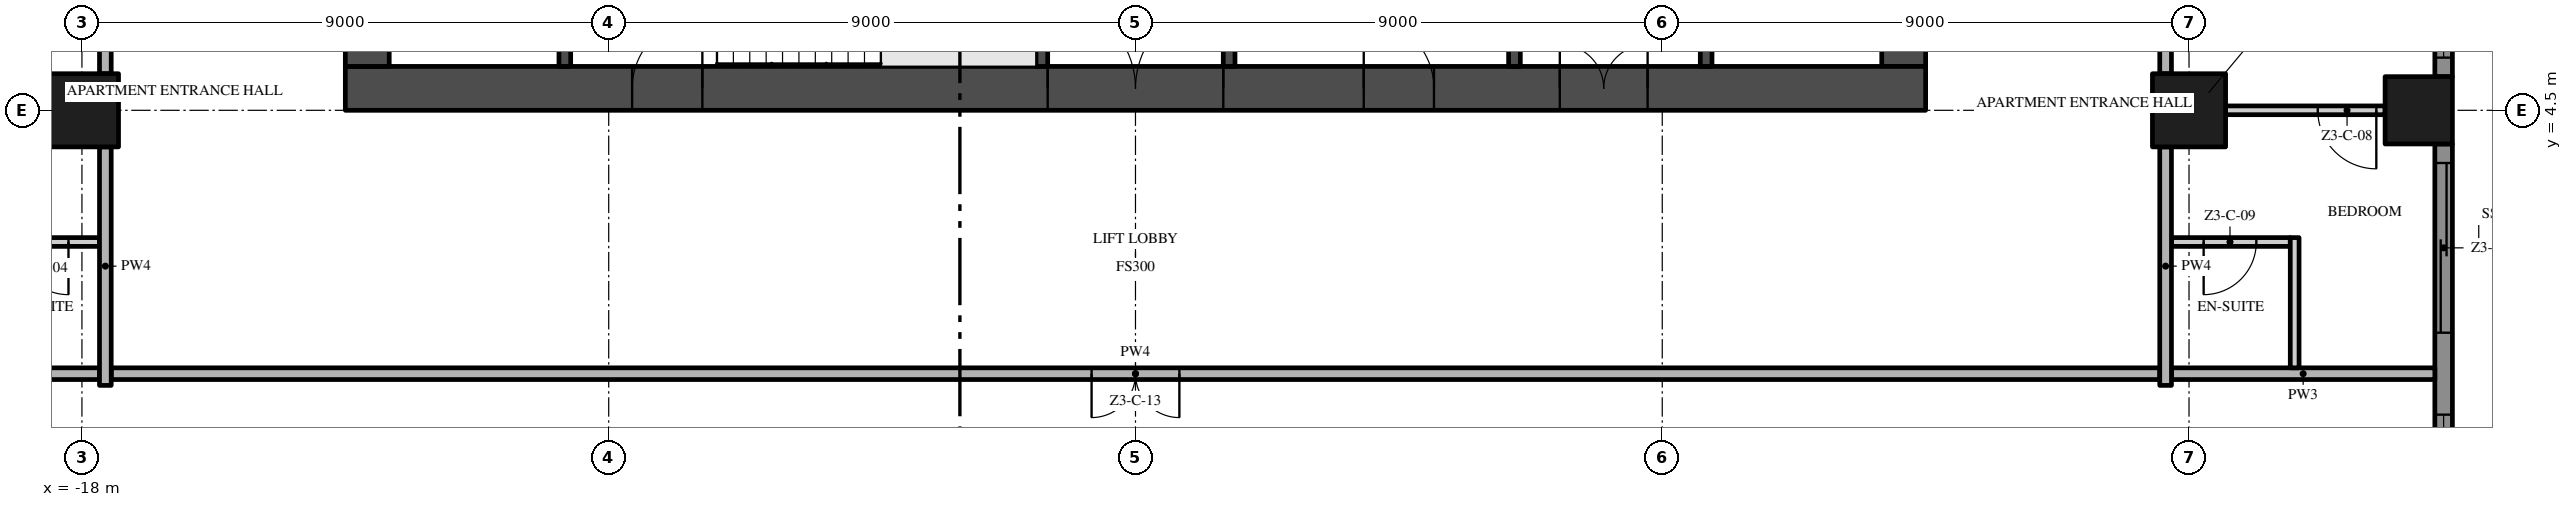
"""IFC4 building model, lengths in metres.
Left out: names, types, materials, properties, quantities, classifications, styles, units other than length and angle.
Written with IfcOpenShell. Run it as: python <this file> out.ifc"""

import sys

from ifc_helpers import new_model, si_unit, direction, frame, frame_2d, origin, origin_2d, place, context, subcontext, project, spatial, polyline, rectangle, outline, extrude, element, fill, save


model = new_model("IFC4")
c1 = context("Model", 3, precision=1e-05, world=origin(), true_north=direction((0.0, 1.0)))
c2 = subcontext(c1, "Body", "Model", "MODEL_VIEW")
j1 = project(units=[si_unit("LENGTHUNIT", "METRE"), si_unit("PLANEANGLEUNIT", "RADIAN")], contexts=[c1])
p1 = place(None, origin())
s1 = spatial("IfcSite", under=j1, at=p1, CompositionType="ELEMENT")
p2 = place(p1, origin())
s2 = spatial("IfcBuilding", under=s1, at=p2, CompositionType="ELEMENT")
p3 = place(p2, frame((0.0, 0.0, 147.8)))
s3 = spatial("IfcBuildingStorey", under=s2, at=p3, CompositionType="ELEMENT", Elevation=147.8)
p4 = place(p3, frame((-13.5, 4.875, -0.3), z_axis=(0.0, 0.0, 1.0), x_axis=(1.0, 0.0, 0.0)))
e1 = element("IfcWall", 1, at=p4, inside=s3, PredefinedType="SHEAR", context=c2, shape_type="SweptSolid", body=[
    extrude(rectangle(XDim=27.0, YDim=0.75, at=frame_2d((13.5, 0.0))), origin(), (0.0, 0.0, 1.0), 3.8),
])
p5 = place(p4, frame((12.0, 0.0, 0.3)))
e2 = element("IfcOpeningElement", 2, at=p5, cuts=e1, PredefinedType="OPENING", context=c2, shape_type="SweptSolid", body=[
    extrude(rectangle(XDim=3.0, YDim=2.4, at=frame_2d((1.5, 1.2))), frame((0.0, 0.385, 0.0), z_axis=(0.0, -1.0, 0.0), x_axis=(1.0, 0.0, 0.0)), (0.0, 0.0, 1.0), 0.77),
])
p6 = place(p4, frame((4.9, 0.0, 0.3)))
e3 = element("IfcOpeningElement", 3, at=p6, cuts=e1, PredefinedType="OPENING", context=c2, shape_type="SweptSolid", body=[
    extrude(rectangle(XDim=1.2, YDim=2.2, at=frame_2d((0.6, 1.1))), frame((0.0, 0.385, 0.0), z_axis=(0.0, -1.0, 0.0), x_axis=(1.0, 0.0, 0.0)), (0.0, 0.0, 1.0), 0.77),
])
p7 = place(p4, frame((20.75, 0.0, 0.3)))
e4 = element("IfcOpeningElement", 4, at=p7, cuts=e1, PredefinedType="OPENING", context=c2, shape_type="SweptSolid", body=[
    extrude(rectangle(XDim=1.5, YDim=2.2, at=frame_2d((0.75, 1.1))), frame((0.0, 0.385, 0.0), z_axis=(0.0, -1.0, 0.0), x_axis=(1.0, 0.0, 0.0)), (0.0, 0.0, 1.0), 0.77),
])
p8 = place(p4, frame((17.4, 0.0, 0.3)))
e5 = element("IfcOpeningElement", 5, at=p8, cuts=e1, PredefinedType="OPENING", context=c2, shape_type="SweptSolid", body=[
    extrude(rectangle(XDim=1.2, YDim=2.2, at=frame_2d((0.6, 1.1))), frame((0.0, 0.385, 0.0), z_axis=(0.0, -1.0, 0.0), x_axis=(1.0, 0.0, 0.0)), (0.0, 0.0, 1.0), 0.77),
])
p9 = place(p3, frame((13.125, 5.25, -0.3), z_axis=(0.0, 0.0, 1.0), x_axis=(0.0, 1.0, 0.0)))
e6 = element("IfcWall", 6, at=p9, inside=s3, PredefinedType="SHEAR", context=c2, shape_type="SweptSolid", body=[
    extrude(rectangle(XDim=16.5, YDim=0.75, at=frame_2d((8.25, 0.0))), origin(), (0.0, 0.0, 1.0), 3.8),
])
p10 = place(p9, frame((6.15, 0.0, 0.3)))
e7 = element("IfcOpeningElement", 7, at=p10, cuts=e6, PredefinedType="OPENING", context=c2, shape_type="SweptSolid", body=[
    extrude(rectangle(XDim=1.2, YDim=2.2, at=frame_2d((0.6, 1.1))), frame((0.0, 0.385, 0.0), z_axis=(0.0, -1.0, 0.0), x_axis=(1.0, 0.0, 0.0)), (0.0, 0.0, 1.0), 0.77),
])
p11 = place(p3, frame((-13.125, 21.75, -0.3), z_axis=(0.0, 0.0, 1.0), x_axis=(0.0, -1.0, 0.0)))
e8 = element("IfcWall", 8, at=p11, inside=s3, PredefinedType="SHEAR", context=c2, shape_type="SweptSolid", body=[
    extrude(rectangle(XDim=16.5, YDim=0.75, at=frame_2d((8.25, 0.0))), origin(), (0.0, 0.0, 1.0), 3.8),
])
p12 = place(p11, frame((9.15, 0.0, 0.3)))
e9 = element("IfcOpeningElement", 9, at=p12, cuts=e8, PredefinedType="OPENING", context=c2, shape_type="SweptSolid", body=[
    extrude(rectangle(XDim=1.2, YDim=2.2, at=frame_2d((0.6, 1.1))), frame((0.0, 0.385, 0.0), z_axis=(0.0, -1.0, 0.0), x_axis=(1.0, 0.0, 0.0)), (0.0, 0.0, 1.0), 0.77),
])
for number, where, z_axis, x_axis in (
    (10, (-18.0, 4.5, 0.0), (0.0, 0.0, 1.0), (1.0, 0.0, 0.0)),
    (11, (18.0, 4.5, 0.0), (0.0, 0.0, 1.0), (1.0, 0.0, 0.0)),
):
    element("IfcColumn", number, at=place(p3, frame(where, z_axis=z_axis, x_axis=x_axis)), inside=s3, PredefinedType="COLUMN", context=c2, shape_type="SweptSolid", body=[
        extrude(rectangle(XDim=1.25, YDim=1.25, at=origin_2d()), origin(), (0.0, 0.0, 1.0), 3.5),
    ])
p13 = place(p3, frame((21.925, 4.5, 0.0), z_axis=(0.0, 0.0, 1.0), x_axis=(1.0, 0.0, 0.0)))
e12 = element("IfcColumn", 12, at=p13, inside=s3, PredefinedType="COLUMN", context=c2, shape_type="SweptSolid", body=[
    extrude(rectangle(XDim=1.15, YDim=1.15, at=origin_2d()), origin(), (0.0, 0.0, 1.0), 3.5),
])
p14 = place(p3, frame((22.35, 3.925, 0.0), z_axis=(0.0, 0.0, 1.0), x_axis=(0.0, -1.0, 0.0)))
e13 = element("IfcWall", 13, at=p14, inside=s3, PredefinedType="SOLIDWALL", context=c2, shape_type="SweptSolid", body=[
    extrude(rectangle(XDim=7.85, YDim=0.3, at=frame_2d((3.925, 0.0))), origin(), (0.0, 0.0, 1.0), 3.5),
])
p15 = place(p14, frame((4.625, 0.0, 0.45)))
e14 = element("IfcOpeningElement", 14, at=p15, cuts=e13, PredefinedType="OPENING", context=c2, shape_type="SweptSolid", body=[
    extrude(rectangle(XDim=2.9, YDim=2.65, at=frame_2d((1.45, 1.325))), frame((0.0, 0.16, 0.0), z_axis=(0.0, -1.0, 0.0), x_axis=(1.0, 0.0, 0.0)), (0.0, 0.0, 1.0), 0.32),
])
p16 = place(p14, frame((0.325, 0.0, 0.0)))
e15 = element("IfcOpeningElement", 15, at=p16, cuts=e13, PredefinedType="OPENING", context=c2, shape_type="SweptSolid", body=[
    extrude(rectangle(XDim=2.9, YDim=2.4, at=frame_2d((1.45, 1.2))), frame((0.0, 0.16, 0.0), z_axis=(0.0, -1.0, 0.0), x_axis=(1.0, 0.0, 0.0)), (0.0, 0.0, 1.0), 0.32),
])
p17 = place(p3, frame((22.35, 12.925, 0.0), z_axis=(0.0, 0.0, 1.0), x_axis=(0.0, -1.0, 0.0)))
e16 = element("IfcWall", 16, at=p17, inside=s3, PredefinedType="SOLIDWALL", context=c2, shape_type="SweptSolid", body=[
    extrude(rectangle(XDim=7.85, YDim=0.3, at=frame_2d((3.925, 0.0))), origin(), (0.0, 0.0, 1.0), 3.5),
])
p18 = place(p17, frame((4.625, 0.0, 0.45)))
e17 = element("IfcOpeningElement", 17, at=p18, cuts=e16, PredefinedType="OPENING", context=c2, shape_type="SweptSolid", body=[
    extrude(rectangle(XDim=2.9, YDim=2.65, at=frame_2d((1.45, 1.325))), frame((0.0, 0.16, 0.0), z_axis=(0.0, -1.0, 0.0), x_axis=(1.0, 0.0, 0.0)), (0.0, 0.0, 1.0), 0.32),
])
p19 = place(p17, frame((0.325, 0.0, 0.45)))
e18 = element("IfcOpeningElement", 18, at=p19, cuts=e16, PredefinedType="OPENING", context=c2, shape_type="SweptSolid", body=[
    extrude(rectangle(XDim=2.9, YDim=2.65, at=frame_2d((1.45, 1.325))), frame((0.0, 0.16, 0.0), z_axis=(0.0, -1.0, 0.0), x_axis=(1.0, 0.0, 0.0)), (0.0, 0.0, 1.0), 0.32),
])
p20 = place(p3, origin())
e19 = element("IfcWall", 19, at=p20, inside=s3, PredefinedType="USERDEFINED", context=c2, shape_type="SweptSolid", body=[
    extrude(outline(polyline([(25.149, -13.5), (25.485, -12.0), (25.5, -11.625), (25.369, -10.5), (24.845, -9.0), (24.112, -7.5), (23.451, -6.0), (23.115, -4.5), (23.1, -4.125), (23.231, -3.0), (23.755, -1.5), (24.488, 0.0), (25.149, 1.5), (25.485, 3.0), (25.5, 3.375), (25.369, 4.5), (24.845, 6.0), (24.112, 7.5), (23.451, 9.0), (23.115, 10.5), (23.1, 10.875), (23.231, 12.0), (23.755, 13.5), (24.488, 15.0), (25.149, 16.5), (25.485, 18.0), (25.241, 18.055), (24.91, 16.579), (24.261, 15.105), (23.524, 13.596), (22.986, 12.056), (22.849, 10.885), (22.866, 10.467), (23.213, 8.921), (23.885, 7.395), (24.614, 5.904), (25.124, 4.444), (25.249, 3.365), (25.236, 3.033), (24.91, 1.579), (24.261, 0.105), (23.524, -1.404), (22.986, -2.944), (22.849, -4.115), (22.866, -4.533), (23.213, -6.079), (23.885, -7.605), (24.614, -9.096), (25.124, -10.556), (25.249, -11.635), (25.236, -11.967), (24.905, -13.445), (25.149, -13.5)])), origin(), (0.0, 0.0, 1.0), 0.9),
])
for number, where, z_axis, x_axis in (
    (20, (-9.75, 5.25, 0.0), (0.0, 0.0, 1.0), (0.0, 1.0, 0.0)),
    (21, (-1.6, 5.25, 0.0), (0.0, 0.0, 1.0), (0.0, 1.0, 0.0)),
):
    element("IfcWall", number, at=place(p3, frame(where, z_axis=z_axis, x_axis=x_axis)), inside=s3, PredefinedType="SHEAR", context=c2, shape_type="SweptSolid", body=[
        extrude(rectangle(XDim=2.7, YDim=0.2, at=frame_2d((1.35, 0.0))), origin(), (0.0, 0.0, 1.0), 3.5),
    ])
p21 = place(p3, frame((1.6, 11.5, 0.0), z_axis=(0.0, 0.0, 1.0), x_axis=(0.0, -1.0, 0.0)))
e22 = element("IfcWall", 22, at=p21, inside=s3, PredefinedType="SHEAR", context=c2, shape_type="SweptSolid", body=[
    extrude(rectangle(XDim=6.25, YDim=0.2, at=frame_2d((3.125, 0.0))), origin(), (0.0, 0.0, 1.0), 3.5),
])
p22 = place(p21, frame((2.275, 0.0, 0.0)))
e23 = element("IfcOpeningElement", 23, at=p22, cuts=e22, PredefinedType="OPENING", context=c2, shape_type="SweptSolid", body=[
    extrude(rectangle(XDim=0.9, YDim=2.1, at=frame_2d((0.45, 1.05))), frame((0.0, 0.11, 0.0), z_axis=(0.0, -1.0, 0.0), x_axis=(1.0, 0.0, 0.0)), (0.0, 0.0, 1.0), 0.22),
])
p23 = place(p3, frame((6.475, 5.25, 0.0), z_axis=(0.0, 0.0, 1.0), x_axis=(0.0, 1.0, 0.0)))
e24 = element("IfcWall", 24, at=p23, inside=s3, PredefinedType="SHEAR", context=c2, shape_type="SweptSolid", body=[
    extrude(rectangle(XDim=6.25, YDim=0.2, at=frame_2d((3.125, 0.0))), origin(), (0.0, 0.0, 1.0), 3.5),
])
p24 = place(p3, frame((9.75, 5.25, 0.0), z_axis=(0.0, 0.0, 1.0), x_axis=(0.0, 1.0, 0.0)))
e25 = element("IfcWall", 25, at=p24, inside=s3, PredefinedType="SHEAR", context=c2, shape_type="SweptSolid", body=[
    extrude(rectangle(XDim=2.35, YDim=0.2, at=frame_2d((1.175, 0.0))), origin(), (0.0, 0.0, 1.0), 3.5),
])
p25 = place(p24, frame((0.7, 0.0, 0.0)))
e26 = element("IfcOpeningElement", 26, at=p25, cuts=e25, PredefinedType="OPENING", context=c2, shape_type="SweptSolid", body=[
    extrude(rectangle(XDim=1.1, YDim=2.1, at=frame_2d((0.55, 1.05))), frame((0.0, 0.11, 0.0), z_axis=(0.0, -1.0, 0.0), x_axis=(1.0, 0.0, 0.0)), (0.0, 0.0, 1.0), 0.22),
])
p26 = place(p3, frame((17.5, 0.0, 0.0), z_axis=(0.0, 0.0, 1.0), x_axis=(-1.0, 0.0, 0.0)))
e27 = element("IfcWall", 27, at=p26, inside=s3, PredefinedType="PARTITIONING", context=c2, shape_type="SweptSolid", body=[
    extrude(rectangle(XDim=35.0, YDim=0.2, at=frame_2d((17.5, 0.0))), origin(), (0.0, 0.0, 1.0), 3.5),
])
p27 = place(p26, frame((16.75, 0.0, 0.0)))
e28 = element("IfcOpeningElement", 28, at=p27, cuts=e27, PredefinedType="OPENING", context=c2, shape_type="SweptSolid", body=[
    extrude(rectangle(XDim=1.5, YDim=2.4, at=frame_2d((0.75, 1.2))), frame((0.0, 0.11, 0.0), z_axis=(0.0, -1.0, 0.0), x_axis=(1.0, 0.0, 0.0)), (0.0, 0.0, 1.0), 0.22),
])
for number, where, z_axis, x_axis in (
    (29, (-22.2, 0.0, 0.0), (0.0, 0.0, 1.0), (1.0, 0.0, 0.0)),
    (30, (17.7, 0.0, 0.0), (0.0, 0.0, 1.0), (1.0, 0.0, 0.0)),
):
    element("IfcWall", number, at=place(p3, frame(where, z_axis=z_axis, x_axis=x_axis)), inside=s3, PredefinedType="PARTITIONING", context=c2, shape_type="SweptSolid", body=[
        extrude(rectangle(XDim=4.5, YDim=0.2, at=frame_2d((2.25, 0.0))), origin(), (0.0, 0.0, 1.0), 3.5),
    ])
p28 = place(p3, frame((-17.7, 2.25, 0.0), z_axis=(0.0, 0.0, 1.0), x_axis=(-1.0, 0.0, 0.0)))
e31 = element("IfcWall", 31, at=p28, inside=s3, PredefinedType="PARTITIONING", context=c2, shape_type="SweptSolid", body=[
    extrude(rectangle(XDim=2.03, YDim=0.15, at=frame_2d((1.015, 0.0))), origin(), (0.0, 0.0, 1.0), 3.5),
])
p29 = place(p28, frame((0.53, 0.0, 0.0)))
e32 = element("IfcOpeningElement", 32, at=p29, cuts=e31, PredefinedType="OPENING", context=c2, shape_type="SweptSolid", body=[
    extrude(rectangle(XDim=0.9, YDim=2.1, at=frame_2d((0.45, 1.05))), frame((0.0, 0.085, 0.0), z_axis=(0.0, -1.0, 0.0), x_axis=(1.0, 0.0, 0.0)), (0.0, 0.0, 1.0), 0.17),
])
p30 = place(p3, frame((19.73, 2.25, 0.0), z_axis=(0.0, 0.0, 1.0), x_axis=(-1.0, 0.0, 0.0)))
e33 = element("IfcWall", 33, at=p30, inside=s3, PredefinedType="PARTITIONING", context=c2, shape_type="SweptSolid", body=[
    extrude(rectangle(XDim=2.03, YDim=0.15, at=frame_2d((1.015, 0.0))), origin(), (0.0, 0.0, 1.0), 3.5),
])
p31 = place(p30, frame((0.58, 0.0, 0.0)))
e34 = element("IfcOpeningElement", 34, at=p31, cuts=e33, PredefinedType="OPENING", context=c2, shape_type="SweptSolid", body=[
    extrude(rectangle(XDim=0.9, YDim=2.1, at=frame_2d((0.45, 1.05))), frame((0.0, 0.085, 0.0), z_axis=(0.0, -1.0, 0.0), x_axis=(1.0, 0.0, 0.0)), (0.0, 0.0, 1.0), 0.17),
])
p32 = place(p3, frame((21.35, 4.5, 0.0), z_axis=(0.0, 0.0, 1.0), x_axis=(-1.0, 0.0, 0.0)))
e35 = element("IfcWall", 35, at=p32, inside=s3, PredefinedType="PARTITIONING", context=c2, shape_type="SweptSolid", body=[
    extrude(rectangle(XDim=2.725, YDim=0.15, at=frame_2d((1.363, 0.0))), origin(), (0.0, 0.0, 1.0), 3.5),
])
p33 = place(p32, frame((0.15, 0.0, 0.0)))
e36 = element("IfcOpeningElement", 36, at=p33, cuts=e35, PredefinedType="OPENING", context=c2, shape_type="SweptSolid", body=[
    extrude(rectangle(XDim=1.0, YDim=2.4, at=frame_2d((0.5, 1.2))), frame((0.0, 0.085, 0.0), z_axis=(0.0, -1.0, 0.0), x_axis=(1.0, 0.0, 0.0)), (0.0, 0.0, 1.0), 0.17),
])
p34 = place(p3, frame((-17.6, -0.2, 0.0), z_axis=(0.0, 0.0, 1.0), x_axis=(0.0, 1.0, 0.0)))
e37 = element("IfcWall", 37, at=p34, inside=s3, PredefinedType="PARTITIONING", context=c2, shape_type="SweptSolid", body=[
    extrude(rectangle(XDim=4.075, YDim=0.2, at=frame_2d((2.038, 0.0))), origin(), (0.0, 0.0, 1.0), 3.5),
])
p35 = place(p3, frame((-17.6, 5.125, 0.0), z_axis=(0.0, 0.0, 1.0), x_axis=(0.0, 1.0, 0.0)))
e38 = element("IfcWall", 38, at=p35, inside=s3, PredefinedType="PARTITIONING", context=c2, shape_type="SweptSolid", body=[
    extrude(rectangle(XDim=7.75, YDim=0.2, at=frame_2d((3.875, 0.0))), origin(), (0.0, 0.0, 1.0), 3.5),
])
p36 = place(p35, frame((1.0, 0.0, 0.0)))
e39 = element("IfcOpeningElement", 39, at=p36, cuts=e38, PredefinedType="OPENING", context=c2, shape_type="SweptSolid", body=[
    extrude(rectangle(XDim=1.2, YDim=2.4, at=frame_2d((0.6, 1.2))), frame((0.0, 0.11, 0.0), z_axis=(0.0, -1.0, 0.0), x_axis=(1.0, 0.0, 0.0)), (0.0, 0.0, 1.0), 0.22),
])
p37 = place(p3, frame((17.6, -0.2, 0.0), z_axis=(0.0, 0.0, 1.0), x_axis=(0.0, 1.0, 0.0)))
e40 = element("IfcWall", 40, at=p37, inside=s3, PredefinedType="PARTITIONING", context=c2, shape_type="SweptSolid", body=[
    extrude(rectangle(XDim=4.075, YDim=0.2, at=frame_2d((2.038, 0.0))), origin(), (0.0, 0.0, 1.0), 3.5),
])
p38 = place(p3, frame((17.6, 12.875, 0.0), z_axis=(0.0, 0.0, 1.0), x_axis=(0.0, -1.0, 0.0)))
e41 = element("IfcWall", 41, at=p38, inside=s3, PredefinedType="PARTITIONING", context=c2, shape_type="SweptSolid", body=[
    extrude(rectangle(XDim=7.75, YDim=0.2, at=frame_2d((3.875, 0.0))), origin(), (0.0, 0.0, 1.0), 3.5),
])
p39 = place(p38, frame((5.55, 0.0, 0.0)))
e42 = element("IfcOpeningElement", 42, at=p39, cuts=e41, PredefinedType="OPENING", context=c2, shape_type="SweptSolid", body=[
    extrude(rectangle(XDim=1.2, YDim=2.4, at=frame_2d((0.6, 1.2))), frame((0.0, 0.11, 0.0), z_axis=(0.0, -1.0, 0.0), x_axis=(1.0, 0.0, 0.0)), (0.0, 0.0, 1.0), 0.22),
])
p40 = place(p3, frame((19.805, 0.1, 0.0), z_axis=(0.0, 0.0, 1.0), x_axis=(0.0, 1.0, 0.0)))
e43 = element("IfcWall", 43, at=p40, inside=s3, PredefinedType="PARTITIONING", context=c2, shape_type="SweptSolid", body=[
    extrude(rectangle(XDim=2.225, YDim=0.15, at=frame_2d((1.113, 0.0))), origin(), (0.0, 0.0, 1.0), 3.5),
])
p41 = place(p15, origin())
e44 = element("IfcWindow", 44, at=p41, inside=s3, PartitioningType="SINGLE_PANEL", PredefinedType="WINDOW", context=c2, shape_type="SweptSolid", body=[
    extrude(rectangle(XDim=2.9, YDim=2.65, at=frame_2d((1.45, 1.325))), frame((0.0, 0.03, 0.0), z_axis=(0.0, -1.0, 0.0), x_axis=(1.0, 0.0, 0.0)), (0.0, 0.0, 1.0), 0.06),
])
fill(e14, e44)
p42 = place(p16, origin())
e45 = element("IfcDoor", 45, at=p42, inside=s3, OperationType="SINGLE_SWING_LEFT", PredefinedType="DOOR", context=c2, shape_type="SweptSolid", body=[
    extrude(rectangle(XDim=2.9, YDim=2.4, at=frame_2d((1.45, 1.2))), frame((0.0, 0.025, 0.0), z_axis=(0.0, -1.0, 0.0), x_axis=(1.0, 0.0, 0.0)), (0.0, 0.0, 1.0), 0.05),
])
fill(e15, e45)
p43 = place(p18, origin())
e46 = element("IfcWindow", 46, at=p43, inside=s3, PartitioningType="SINGLE_PANEL", PredefinedType="WINDOW", context=c2, shape_type="SweptSolid", body=[
    extrude(rectangle(XDim=2.9, YDim=2.65, at=frame_2d((1.45, 1.325))), frame((0.0, 0.03, 0.0), z_axis=(0.0, -1.0, 0.0), x_axis=(1.0, 0.0, 0.0)), (0.0, 0.0, 1.0), 0.06),
])
fill(e17, e46)
p44 = place(p5, frame((3.0, 0.0, 0.0), z_axis=(0.0, 0.0, 1.0), x_axis=(-1.0, 0.0, 0.0)))
e47 = element("IfcDoor", 47, at=p44, inside=s3, OperationType="DOUBLE_DOOR_SINGLE_SWING", PredefinedType="DOOR", context=c2, shape_type="SweptSolid", body=[
    extrude(rectangle(XDim=3.0, YDim=2.4, at=frame_2d((1.5, 1.2))), frame((0.0, 0.025, 0.0), z_axis=(0.0, -1.0, 0.0), x_axis=(1.0, 0.0, 0.0)), (0.0, 0.0, 1.0), 0.05),
])
fill(e2, e47)
p45 = place(p6, frame((1.2, 0.0, 0.0), z_axis=(0.0, 0.0, 1.0), x_axis=(-1.0, 0.0, 0.0)))
e48 = element("IfcDoor", 48, at=p45, inside=s3, OperationType="SINGLE_SWING_LEFT", PredefinedType="DOOR", context=c2, shape_type="SweptSolid", body=[
    extrude(rectangle(XDim=1.2, YDim=2.2, at=frame_2d((0.6, 1.1))), frame((0.0, 0.025, 0.0), z_axis=(0.0, -1.0, 0.0), x_axis=(1.0, 0.0, 0.0)), (0.0, 0.0, 1.0), 0.05),
])
fill(e3, e48)
p46 = place(p7, frame((1.5, 0.0, 0.0), z_axis=(0.0, 0.0, 1.0), x_axis=(-1.0, 0.0, 0.0)))
e49 = element("IfcDoor", 49, at=p46, inside=s3, OperationType="DOUBLE_DOOR_SINGLE_SWING", PredefinedType="DOOR", context=c2, shape_type="SweptSolid", body=[
    extrude(rectangle(XDim=1.5, YDim=2.2, at=frame_2d((0.75, 1.1))), frame((0.0, 0.025, 0.0), z_axis=(0.0, -1.0, 0.0), x_axis=(1.0, 0.0, 0.0)), (0.0, 0.0, 1.0), 0.05),
])
fill(e4, e49)
p47 = place(p8, frame((1.2, 0.0, 0.0), z_axis=(0.0, 0.0, 1.0), x_axis=(-1.0, 0.0, 0.0)))
e50 = element("IfcDoor", 50, at=p47, inside=s3, OperationType="SINGLE_SWING_RIGHT", PredefinedType="DOOR", context=c2, shape_type="SweptSolid", body=[
    extrude(rectangle(XDim=1.2, YDim=2.2, at=frame_2d((0.6, 1.1))), frame((0.0, 0.025, 0.0), z_axis=(0.0, -1.0, 0.0), x_axis=(1.0, 0.0, 0.0)), (0.0, 0.0, 1.0), 0.05),
])
fill(e5, e50)
p48 = place(p29, origin())
e51 = element("IfcDoor", 51, at=p48, inside=s3, OperationType="SINGLE_SWING_LEFT", PredefinedType="DOOR", context=c2, shape_type="SweptSolid", body=[
    extrude(rectangle(XDim=0.9, YDim=2.1, at=frame_2d((0.45, 1.05))), frame((0.0, 0.025, 0.0), z_axis=(0.0, -1.0, 0.0), x_axis=(1.0, 0.0, 0.0)), (0.0, 0.0, 1.0), 0.05),
])
fill(e32, e51)
p49 = place(p33, origin())
e52 = element("IfcDoor", 52, at=p49, inside=s3, OperationType="SINGLE_SWING_LEFT", PredefinedType="DOOR", context=c2, shape_type="SweptSolid", body=[
    extrude(rectangle(XDim=1.0, YDim=2.4, at=frame_2d((0.5, 1.2))), frame((0.0, 0.025, 0.0), z_axis=(0.0, -1.0, 0.0), x_axis=(1.0, 0.0, 0.0)), (0.0, 0.0, 1.0), 0.05),
])
fill(e36, e52)
p50 = place(p31, origin())
e53 = element("IfcDoor", 53, at=p50, inside=s3, OperationType="SINGLE_SWING_RIGHT", PredefinedType="DOOR", context=c2, shape_type="SweptSolid", body=[
    extrude(rectangle(XDim=0.9, YDim=2.1, at=frame_2d((0.45, 1.05))), frame((0.0, 0.025, 0.0), z_axis=(0.0, -1.0, 0.0), x_axis=(1.0, 0.0, 0.0)), (0.0, 0.0, 1.0), 0.05),
])
fill(e34, e53)
p51 = place(p27, origin())
e54 = element("IfcDoor", 54, at=p51, inside=s3, OperationType="DOUBLE_DOOR_SINGLE_SWING", PredefinedType="DOOR", context=c2, shape_type="SweptSolid", body=[
    extrude(rectangle(XDim=1.5, YDim=2.4, at=frame_2d((0.75, 1.2))), frame((0.0, 0.025, 0.0), z_axis=(0.0, -1.0, 0.0), x_axis=(1.0, 0.0, 0.0)), (0.0, 0.0, 1.0), 0.05),
])
fill(e28, e54)
save(model, sys.argv[1])
